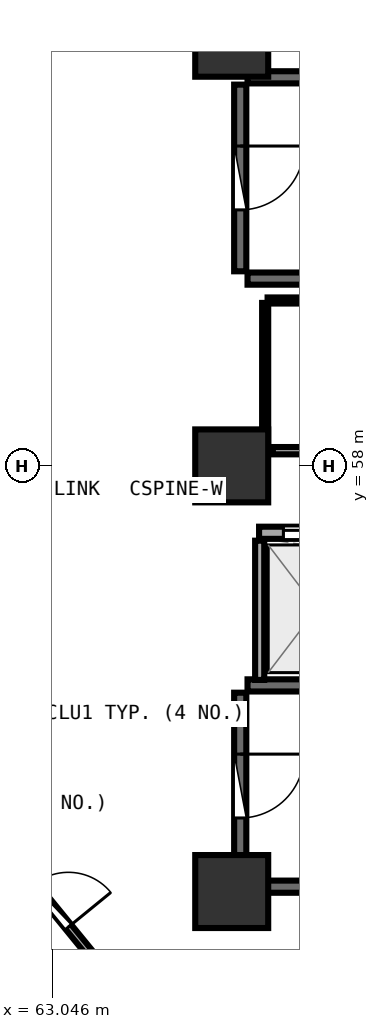
"""IFC4 building model, lengths in metres.
Left out: names, types, materials, properties, quantities, classifications, styles, units other than length and angle.
Written with IfcOpenShell. Run it as: python <this file> out.ifc"""

import sys

from ifc_helpers import new_model, si_unit, direction, frame, frame_2d, origin, origin_2d, place, context, subcontext, project, spatial, rectangle, extrude, element, fill, save


model = new_model("IFC4")
c1 = context("Model", 3, precision=1e-05, world=origin(), true_north=direction((0.0, 1.0)))
c2 = subcontext(c1, "Body", "Model", "MODEL_VIEW")
j1 = project(units=[si_unit("LENGTHUNIT", "METRE"), si_unit("PLANEANGLEUNIT", "RADIAN")], contexts=[c1])
p1 = place(None, origin())
s1 = spatial("IfcSite", under=j1, at=p1, CompositionType="ELEMENT")
p2 = place(p1, origin())
s2 = spatial("IfcBuilding", under=s1, at=p2, CompositionType="ELEMENT")
p3 = place(p2, frame((0.0, 0.0, 154.35)))
s3 = spatial("IfcBuildingStorey", under=s2, at=p3, CompositionType="ELEMENT", Elevation=154.35)
for number, where, z_axis, x_axis in (
    (1, (66.0, 51.0, 0.0), (0.0, 0.0, 1.0), (1.0, 0.0, 0.0)),
    (2, (66.0, 65.0, 0.0), (0.0, 0.0, 1.0), (1.0, 0.0, 0.0)),
    (3, (66.0, 58.0, 0.0), (0.0, 0.0, 1.0), (1.0, 0.0, 0.0)),
):
    element("IfcColumn", number, at=place(p3, frame(where, z_axis=z_axis, x_axis=x_axis)), inside=s3, PredefinedType="PILASTER", context=c2, shape_type="SweptSolid", body=[
        extrude(rectangle(XDim=1.2, YDim=1.2, at=origin_2d()), origin(), (0.0, 0.0, 1.0), 3.75),
    ])
for number, where, z_axis, x_axis in (
    (4, (66.26, 61.08, 0.0), (0.0, 0.0, 1.0), (1.0, 0.0, 0.0)),
    (5, (73.42, 64.39, 0.0), (0.0, 0.0, 1.0), (-1.0, 0.0, 0.0)),
):
    element("IfcWall", number, at=place(p3, frame(where, z_axis=z_axis, x_axis=x_axis)), inside=s3, PredefinedType="SHEAR", context=c2, shape_type="SweptSolid", body=[
        extrude(rectangle(XDim=7.16, YDim=0.2, at=frame_2d((3.58, 0.0))), origin(), (0.0, 0.0, 1.0), 3.49),
    ])
p4 = place(p3, frame((66.14, 64.27, 0.0), z_axis=(0.0, 0.0, 1.0), x_axis=(0.0, -1.0, 0.0)))
e6 = element("IfcWall", 6, at=p4, inside=s3, PredefinedType="SHEAR", context=c2, shape_type="SweptSolid", body=[
    extrude(rectangle(XDim=3.07, YDim=0.2, at=frame_2d((1.535, 0.0))), origin(), (0.0, 0.0, 1.0), 3.49),
])
p5 = place(p4, frame((1.01, 0.0, 0.0)))
e7 = element("IfcOpeningElement", 7, at=p5, cuts=e6, PredefinedType="OPENING", context=c2, shape_type="SweptSolid", body=[
    extrude(rectangle(XDim=1.05, YDim=2.1, at=frame_2d((0.525, 1.05))), frame((0.0, 0.11, 0.0), z_axis=(0.0, -1.0, 0.0), x_axis=(1.0, 0.0, 0.0)), (0.0, 0.0, 1.0), 0.22),
])
for number, where, z_axis, x_axis in (
    (8, (66.26, 51.08, 0.0), (0.0, 0.0, 1.0), (1.0, 0.0, 0.0)),
    (9, (73.42, 54.39, 0.0), (0.0, 0.0, 1.0), (-1.0, 0.0, 0.0)),
):
    element("IfcWall", number, at=place(p3, frame(where, z_axis=z_axis, x_axis=x_axis)), inside=s3, PredefinedType="SHEAR", context=c2, shape_type="SweptSolid", body=[
        extrude(rectangle(XDim=7.16, YDim=0.2, at=frame_2d((3.58, 0.0))), origin(), (0.0, 0.0, 1.0), 3.49),
    ])
p6 = place(p3, frame((66.14, 54.27, 0.0), z_axis=(0.0, 0.0, 1.0), x_axis=(0.0, -1.0, 0.0)))
e10 = element("IfcWall", 10, at=p6, inside=s3, PredefinedType="SHEAR", context=c2, shape_type="SweptSolid", body=[
    extrude(rectangle(XDim=3.07, YDim=0.2, at=frame_2d((1.535, 0.0))), origin(), (0.0, 0.0, 1.0), 3.49),
])
p7 = place(p6, frame((1.01, 0.0, 0.0)))
e11 = element("IfcOpeningElement", 11, at=p7, cuts=e10, PredefinedType="OPENING", context=c2, shape_type="SweptSolid", body=[
    extrude(rectangle(XDim=1.05, YDim=2.1, at=frame_2d((0.525, 1.05))), frame((0.0, 0.11, 0.0), z_axis=(0.0, -1.0, 0.0), x_axis=(1.0, 0.0, 0.0)), (0.0, 0.0, 1.0), 0.22),
])
p8 = place(p3, frame((66.45, 56.9, 0.0), z_axis=(0.0, 0.0, 1.0), x_axis=(1.0, 0.0, 0.0)))
e12 = element("IfcWall", 12, at=p8, inside=s3, PredefinedType="SOLIDWALL", context=c2, shape_type="SweptSolid", body=[
    extrude(rectangle(XDim=14.4, YDim=0.2, at=frame_2d((7.2, 0.0))), origin(), (0.0, 0.0, 1.0), 3.48),
])
p9 = place(p8, frame((0.4, 0.0, 0.0)))
e13 = element("IfcOpeningElement", 13, at=p9, cuts=e12, PredefinedType="OPENING", context=c2, shape_type="SweptSolid", body=[
    extrude(rectangle(XDim=1.1, YDim=2.1, at=frame_2d((0.55, 1.05))), frame((0.0, 0.11, 0.0), z_axis=(0.0, -1.0, 0.0), x_axis=(1.0, 0.0, 0.0)), (0.0, 0.0, 1.0), 0.22),
])
p10 = place(p8, frame((2.4, 0.0, 0.0)))
e14 = element("IfcOpeningElement", 14, at=p10, cuts=e12, PredefinedType="OPENING", context=c2, shape_type="SweptSolid", body=[
    extrude(rectangle(XDim=1.1, YDim=2.1, at=frame_2d((0.55, 1.05))), frame((0.0, 0.11, 0.0), z_axis=(0.0, -1.0, 0.0), x_axis=(1.0, 0.0, 0.0)), (0.0, 0.0, 1.0), 0.22),
])
p11 = place(p8, frame((4.4, 0.0, 0.0)))
e15 = element("IfcOpeningElement", 15, at=p11, cuts=e12, PredefinedType="OPENING", context=c2, shape_type="SweptSolid", body=[
    extrude(rectangle(XDim=1.1, YDim=2.1, at=frame_2d((0.55, 1.05))), frame((0.0, 0.11, 0.0), z_axis=(0.0, -1.0, 0.0), x_axis=(1.0, 0.0, 0.0)), (0.0, 0.0, 1.0), 0.22),
])
p12 = place(p3, frame((66.46, 54.48, 0.0), z_axis=(0.0, 0.0, 1.0), x_axis=(0.0, 1.0, 0.0)))
e16 = element("IfcWall", 16, at=p12, inside=s3, PredefinedType="PARTITIONING", context=c2, shape_type="SweptSolid", body=[
    extrude(rectangle(XDim=2.29, YDim=0.15, at=frame_2d((1.145, 0.0))), origin(), (0.0, 0.0, 1.0), 3.48),
])
p13 = place(p3, frame((66.675, 58.25, 0.0), z_axis=(0.0, 0.0, 1.0), x_axis=(1.0, 0.0, 0.0)))
e17 = element("IfcWall", 17, at=p13, inside=s3, PredefinedType="PARTITIONING", context=c2, shape_type="SweptSolid", body=[
    extrude(rectangle(XDim=5.715, YDim=0.12, at=frame_2d((2.857, 0.0))), origin(), (0.0, 0.0, 1.0), 3.48),
])
p14 = place(p13, frame((2.407, 0.0, 0.0)))
e18 = element("IfcOpeningElement", 18, at=p14, cuts=e17, PredefinedType="OPENING", context=c2, shape_type="SweptSolid", body=[
    extrude(rectangle(XDim=0.9, YDim=2.08, at=frame_2d((0.45, 1.04))), frame((0.0, 0.07, 0.0), z_axis=(0.0, -1.0, 0.0), x_axis=(1.0, 0.0, 0.0)), (0.0, 0.0, 1.0), 0.14),
])
p15 = place(p3, frame((61.604, 52.511, 0.0), z_axis=(0.0, 0.0, 1.0), x_axis=(0.632491819148, -0.77456703952, 0.0)))
e19 = element("IfcWall", 19, at=p15, inside=s3, PredefinedType="PARTITIONING", context=c2, shape_type="SweptSolid", body=[
    extrude(rectangle(XDim=4.511, YDim=0.12, at=frame_2d((2.255, 0.0))), origin(), (0.0, 0.0, 1.0), 2.975),
])
p16 = place(p15, frame((1.805, 0.0, 0.0)))
e20 = element("IfcOpeningElement", 20, at=p16, cuts=e19, PredefinedType="OPENING", context=c2, shape_type="SweptSolid", body=[
    extrude(rectangle(XDim=0.9, YDim=2.08, at=frame_2d((0.45, 1.04))), frame((0.0, 0.07, 0.0), z_axis=(0.0, -1.0, 0.0), x_axis=(1.0, 0.0, 0.0)), (0.0, 0.0, 1.0), 0.14),
])
p17 = place(p3, frame((72.41, 60.72, 0.0), z_axis=(0.0, 0.0, 1.0), x_axis=(-1.0, 0.0, 0.0)))
e21 = element("IfcWall", 21, at=p17, inside=s3, PredefinedType="PARTITIONING", context=c2, shape_type="SweptSolid", body=[
    extrude(rectangle(XDim=5.82, YDim=0.1, at=frame_2d((2.91, 0.0))), origin(), (0.0, 0.0, 1.0), 3.48),
])
p18 = place(p3, frame((66.55, 60.68, 0.0), z_axis=(0.0, 0.0, 1.0), x_axis=(0.0, -1.0, 0.0)))
e22 = element("IfcWall", 22, at=p18, inside=s3, PredefinedType="PARTITIONING", context=c2, shape_type="SweptSolid", body=[
    extrude(rectangle(XDim=2.383, YDim=0.1, at=frame_2d((1.191, 0.0))), origin(), (0.0, 0.0, 1.0), 3.48),
])
p19 = place(p5, origin())
e23 = element("IfcDoor", 23, at=p19, inside=s3, OperationType="SINGLE_SWING_LEFT", PredefinedType="DOOR", context=c2, shape_type="SweptSolid", body=[
    extrude(rectangle(XDim=1.05, YDim=2.1, at=frame_2d((0.525, 1.05))), frame((0.0, 0.025, 0.0), z_axis=(0.0, -1.0, 0.0), x_axis=(1.0, 0.0, 0.0)), (0.0, 0.0, 1.0), 0.05),
])
fill(e7, e23)
p20 = place(p7, origin())
e24 = element("IfcDoor", 24, at=p20, inside=s3, OperationType="SINGLE_SWING_LEFT", PredefinedType="DOOR", context=c2, shape_type="SweptSolid", body=[
    extrude(rectangle(XDim=1.05, YDim=2.1, at=frame_2d((0.525, 1.05))), frame((0.0, 0.025, 0.0), z_axis=(0.0, -1.0, 0.0), x_axis=(1.0, 0.0, 0.0)), (0.0, 0.0, 1.0), 0.05),
])
fill(e11, e24)
p21 = place(p9, origin())
e25 = element("IfcDoor", 25, at=p21, inside=s3, OperationType="DOUBLE_DOOR_SLIDING", PredefinedType="DOOR", context=c2, shape_type="SweptSolid", body=[
    extrude(rectangle(XDim=1.1, YDim=2.1, at=frame_2d((0.55, 1.05))), frame((0.0, 0.025, 0.0), z_axis=(0.0, -1.0, 0.0), x_axis=(1.0, 0.0, 0.0)), (0.0, 0.0, 1.0), 0.05),
])
fill(e13, e25)
p22 = place(p16, origin())
e26 = element("IfcDoor", 26, at=p22, inside=s3, OperationType="SINGLE_SWING_RIGHT", PredefinedType="DOOR", context=c2, shape_type="SweptSolid", body=[
    extrude(rectangle(XDim=0.9, YDim=2.08, at=frame_2d((0.45, 1.04))), frame((0.0, 0.025, 0.0), z_axis=(0.0, -1.0, 0.0), x_axis=(1.0, 0.0, 0.0)), (0.0, 0.0, 1.0), 0.05),
])
fill(e20, e26)
save(model, sys.argv[1])
